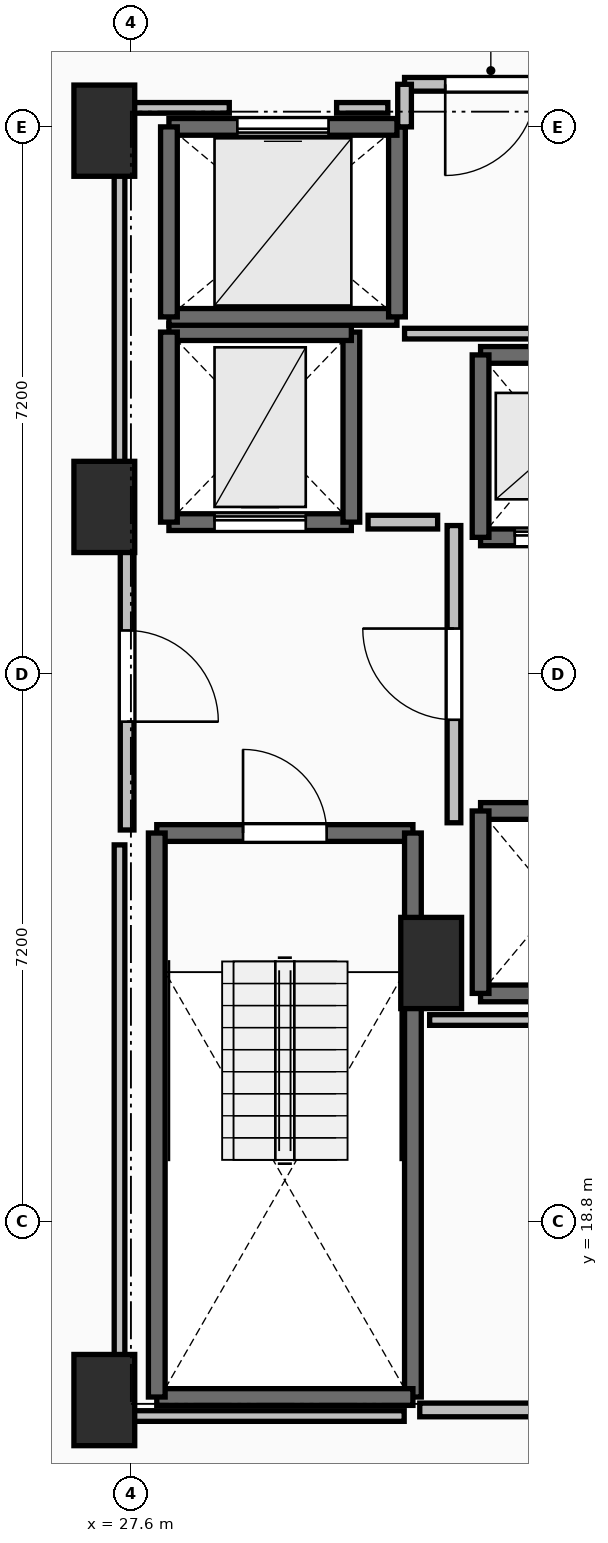
"""IFC4 building model, lengths in metres.
Left out: names, types, materials, properties, quantities, classifications, styles, units other than length and angle.
Written with IfcOpenShell. Run it as: python <this file> out.ifc"""

import sys

from ifc_helpers import new_model, si_unit, direction, frame, frame_2d, origin, origin_2d, place, context, subcontext, project, spatial, rectangle, extrude, element, fill, save


model = new_model("IFC4")
c1 = context("Model", 3, precision=1e-05, world=origin(), true_north=direction((0.0, 1.0)))
c2 = subcontext(c1, "Body", "Model", "MODEL_VIEW")
j1 = project(units=[si_unit("LENGTHUNIT", "METRE"), si_unit("PLANEANGLEUNIT", "RADIAN")], contexts=[c1])
p1 = place(None, origin())
s1 = spatial("IfcSite", under=j1, at=p1, CompositionType="ELEMENT")
p2 = place(p1, origin())
s2 = spatial("IfcBuilding", under=s1, at=p2, CompositionType="ELEMENT")
p3 = place(p2, frame((0.0, 0.0, 38.0)))
s3 = spatial("IfcBuildingStorey", under=s2, at=p3, CompositionType="ELEMENT", Elevation=38.0)
for number, where, z_axis, x_axis in (
    (1, (27.25, 16.45, 0.0), (0.0, 0.0, 1.0), (1.0, 0.0, 0.0)),
    (2, (27.25, 28.2, 0.0), (0.0, 0.0, 1.0), (1.0, 0.0, 0.0)),
    (3, (27.25, 33.15, 0.0), (0.0, 0.0, 1.0), (1.0, 0.0, 0.0)),
    (4, (31.55, 22.2, 0.0), (0.0, 0.0, 1.0), (1.0, 0.0, 0.0)),
):
    element("IfcColumn", number, at=place(p3, frame(where, z_axis=z_axis, x_axis=x_axis)), inside=s3, PredefinedType="PILASTER", context=c2, shape_type="SweptSolid", body=[
        extrude(rectangle(XDim=0.8, YDim=1.2, at=origin_2d()), origin(), (0.0, 0.0, 1.0), 3.5),
    ])
p4 = place(p3, frame((27.94, 23.91, 0.0), z_axis=(0.0, 0.0, 1.0), x_axis=(1.0, 0.0, 0.0)))
e5 = element("IfcWall", 5, at=p4, inside=s3, PredefinedType="SOLIDWALL", context=c2, shape_type="SweptSolid", body=[
    extrude(rectangle(XDim=3.37, YDim=0.22, at=frame_2d((1.685, 0.0))), origin(), (0.0, 0.0, 1.0), 3.24),
])
p5 = place(p4, frame((1.135, 0.0, 0.0)))
e6 = element("IfcOpeningElement", 6, at=p5, cuts=e5, PredefinedType="OPENING", context=c2, shape_type="SweptSolid", body=[
    extrude(rectangle(XDim=1.1, YDim=2.15, at=frame_2d((0.55, 1.075))), frame((0.0, 0.125, 0.0), z_axis=(0.0, -1.0, 0.0), x_axis=(1.0, 0.0, 0.0)), (0.0, 0.0, 1.0), 0.25),
])
p6 = place(p3, frame((31.31, 23.91, 0.0), z_axis=(0.0, 0.0, 1.0), x_axis=(0.0, -1.0, 0.0)))
e7 = element("IfcWall", 7, at=p6, inside=s3, PredefinedType="SOLIDWALL", context=c2, shape_type="SweptSolid", body=[
    extrude(rectangle(XDim=7.42, YDim=0.22, at=frame_2d((3.71, 0.0))), origin(), (0.0, 0.0, 1.0), 3.24),
])
p7 = place(p3, frame((31.31, 16.49, 0.0), z_axis=(0.0, 0.0, 1.0), x_axis=(-1.0, 0.0, 0.0)))
e8 = element("IfcWall", 8, at=p7, inside=s3, PredefinedType="SOLIDWALL", context=c2, shape_type="SweptSolid", body=[
    extrude(rectangle(XDim=3.37, YDim=0.22, at=frame_2d((1.685, 0.0))), origin(), (0.0, 0.0, 1.0), 3.24),
])
p8 = place(p3, frame((27.94, 16.49, 0.0), z_axis=(0.0, 0.0, 1.0), x_axis=(0.0, 1.0, 0.0)))
e9 = element("IfcWall", 9, at=p8, inside=s3, PredefinedType="SOLIDWALL", context=c2, shape_type="SweptSolid", body=[
    extrude(rectangle(XDim=7.42, YDim=0.22, at=frame_2d((3.71, 0.0))), origin(), (0.0, 0.0, 1.0), 3.24),
])
p9 = place(p3, frame((32.2, 27.8, 0.0), z_axis=(0.0, 0.0, 1.0), x_axis=(1.0, 0.0, 0.0)))
e10 = element("IfcWall", 10, at=p9, inside=s3, PredefinedType="SOLIDWALL", context=c2, shape_type="SweptSolid", body=[
    extrude(rectangle(XDim=2.0, YDim=0.22, at=frame_2d((1.0, 0.0))), origin(), (0.0, 0.0, 1.0), 3.24),
])
p10 = place(p9, frame((0.45, 0.0, 0.0)))
e11 = element("IfcOpeningElement", 11, at=p10, cuts=e10, PredefinedType="OPENING", context=c2, shape_type="SweptSolid", body=[
    extrude(rectangle(XDim=1.1, YDim=2.2, at=frame_2d((0.55, 1.1))), frame((0.0, 0.125, 0.0), z_axis=(0.0, -1.0, 0.0), x_axis=(1.0, 0.0, 0.0)), (0.0, 0.0, 1.0), 0.25),
])
p11 = place(p3, frame((34.2, 30.2, 0.0), z_axis=(0.0, 0.0, 1.0), x_axis=(-1.0, 0.0, 0.0)))
e12 = element("IfcWall", 12, at=p11, inside=s3, PredefinedType="SOLIDWALL", context=c2, shape_type="SweptSolid", body=[
    extrude(rectangle(XDim=2.0, YDim=0.22, at=frame_2d((1.0, 0.0))), origin(), (0.0, 0.0, 1.0), 3.24),
])
p12 = place(p3, frame((32.2, 30.2, 0.0), z_axis=(0.0, 0.0, 1.0), x_axis=(0.0, -1.0, 0.0)))
e13 = element("IfcWall", 13, at=p12, inside=s3, PredefinedType="SOLIDWALL", context=c2, shape_type="SweptSolid", body=[
    extrude(rectangle(XDim=2.4, YDim=0.22, at=frame_2d((1.2, 0.0))), origin(), (0.0, 0.0, 1.0), 3.24),
])
for number, where, z_axis, x_axis in (
    (14, (32.2, 21.8, 0.0), (0.0, 0.0, 1.0), (1.0, 0.0, 0.0)),
    (15, (34.2, 24.2, 0.0), (0.0, 0.0, 1.0), (-1.0, 0.0, 0.0)),
):
    element("IfcWall", number, at=place(p3, frame(where, z_axis=z_axis, x_axis=x_axis)), inside=s3, PredefinedType="SOLIDWALL", context=c2, shape_type="SweptSolid", body=[
        extrude(rectangle(XDim=2.0, YDim=0.22, at=frame_2d((1.0, 0.0))), origin(), (0.0, 0.0, 1.0), 3.24),
    ])
p13 = place(p3, frame((32.2, 24.2, 0.0), z_axis=(0.0, 0.0, 1.0), x_axis=(0.0, -1.0, 0.0)))
e16 = element("IfcWall", 16, at=p13, inside=s3, PredefinedType="SOLIDWALL", context=c2, shape_type="SweptSolid", body=[
    extrude(rectangle(XDim=2.4, YDim=0.22, at=frame_2d((1.2, 0.0))), origin(), (0.0, 0.0, 1.0), 3.24),
])
p14 = place(p3, frame((28.1, 28.0, 0.0), z_axis=(0.0, 0.0, 1.0), x_axis=(1.0, 0.0, 0.0)))
e17 = element("IfcWall", 17, at=p14, inside=s3, PredefinedType="SHEAR", context=c2, shape_type="SweptSolid", body=[
    extrude(rectangle(XDim=2.4, YDim=0.22, at=frame_2d((1.2, 0.0))), origin(), (0.0, 0.0, 1.0), 3.24),
])
p15 = place(p14, frame((0.6, 0.0, 0.0)))
e18 = element("IfcOpeningElement", 18, at=p15, cuts=e17, PredefinedType="OPENING", context=c2, shape_type="SweptSolid", body=[
    extrude(rectangle(XDim=1.2, YDim=2.2, at=frame_2d((0.6, 1.1))), frame((0.0, 0.125, 0.0), z_axis=(0.0, -1.0, 0.0), x_axis=(1.0, 0.0, 0.0)), (0.0, 0.0, 1.0), 0.25),
])
p16 = place(p3, frame((30.5, 28.0, 0.0), z_axis=(0.0, 0.0, 1.0), x_axis=(0.0, 1.0, 0.0)))
e19 = element("IfcWall", 19, at=p16, inside=s3, PredefinedType="SHEAR", context=c2, shape_type="SweptSolid", body=[
    extrude(rectangle(XDim=2.5, YDim=0.22, at=frame_2d((1.25, 0.0))), origin(), (0.0, 0.0, 1.0), 3.24),
])
p17 = place(p3, frame((30.5, 30.5, 0.0), z_axis=(0.0, 0.0, 1.0), x_axis=(-1.0, 0.0, 0.0)))
e20 = element("IfcWall", 20, at=p17, inside=s3, PredefinedType="SHEAR", context=c2, shape_type="SweptSolid", body=[
    extrude(rectangle(XDim=2.4, YDim=0.22, at=frame_2d((1.2, 0.0))), origin(), (0.0, 0.0, 1.0), 3.24),
])
p18 = place(p3, frame((28.1, 30.5, 0.0), z_axis=(0.0, 0.0, 1.0), x_axis=(0.0, -1.0, 0.0)))
e21 = element("IfcWall", 21, at=p18, inside=s3, PredefinedType="SHEAR", context=c2, shape_type="SweptSolid", body=[
    extrude(rectangle(XDim=2.5, YDim=0.22, at=frame_2d((1.25, 0.0))), origin(), (0.0, 0.0, 1.0), 3.24),
])
p19 = place(p3, frame((28.1, 30.7, 0.0), z_axis=(0.0, 0.0, 1.0), x_axis=(1.0, 0.0, 0.0)))
e22 = element("IfcWall", 22, at=p19, inside=s3, PredefinedType="SOLIDWALL", context=c2, shape_type="SweptSolid", body=[
    extrude(rectangle(XDim=3.0, YDim=0.22, at=frame_2d((1.5, 0.0))), origin(), (0.0, 0.0, 1.0), 3.24),
])
p20 = place(p3, frame((31.1, 30.7, 0.0), z_axis=(0.0, 0.0, 1.0), x_axis=(0.0, 1.0, 0.0)))
e23 = element("IfcWall", 23, at=p20, inside=s3, PredefinedType="SOLIDWALL", context=c2, shape_type="SweptSolid", body=[
    extrude(rectangle(XDim=2.5, YDim=0.22, at=frame_2d((1.25, 0.0))), origin(), (0.0, 0.0, 1.0), 3.24),
])
p21 = place(p3, frame((31.1, 33.2, 0.0), z_axis=(0.0, 0.0, 1.0), x_axis=(-1.0, 0.0, 0.0)))
e24 = element("IfcWall", 24, at=p21, inside=s3, PredefinedType="SOLIDWALL", context=c2, shape_type="SweptSolid", body=[
    extrude(rectangle(XDim=3.0, YDim=0.22, at=frame_2d((1.5, 0.0))), origin(), (0.0, 0.0, 1.0), 3.24),
])
p22 = place(p21, frame((0.9, 0.0, 0.0)))
e25 = element("IfcOpeningElement", 25, at=p22, cuts=e24, PredefinedType="OPENING", context=c2, shape_type="SweptSolid", body=[
    extrude(rectangle(XDim=1.2, YDim=2.2, at=frame_2d((0.6, 1.1))), frame((0.0, 0.125, 0.0), z_axis=(0.0, -1.0, 0.0), x_axis=(1.0, 0.0, 0.0)), (0.0, 0.0, 1.0), 0.25),
])
p23 = place(p3, frame((28.1, 33.2, 0.0), z_axis=(0.0, 0.0, 1.0), x_axis=(0.0, -1.0, 0.0)))
e26 = element("IfcWall", 26, at=p23, inside=s3, PredefinedType="SOLIDWALL", context=c2, shape_type="SweptSolid", body=[
    extrude(rectangle(XDim=2.5, YDim=0.22, at=frame_2d((1.25, 0.0))), origin(), (0.0, 0.0, 1.0), 3.24),
])
p24 = place(p3, frame((31.85, 24.045, 0.0), z_axis=(0.0, 0.0, 1.0), x_axis=(0.0, 1.0, 0.0)))
e27 = element("IfcWall", 27, at=p24, inside=s3, PredefinedType="PARTITIONING", context=c2, shape_type="SweptSolid", body=[
    extrude(rectangle(XDim=3.91, YDim=0.18, at=frame_2d((1.955, 0.0))), origin(), (0.0, 0.0, 1.0), 3.24),
])
p25 = place(p24, frame((1.355, 0.0, 0.0)))
e28 = element("IfcOpeningElement", 28, at=p25, cuts=e27, PredefinedType="OPENING", context=c2, shape_type="SweptSolid", body=[
    extrude(rectangle(XDim=1.2, YDim=2.15, at=frame_2d((0.6, 1.075))), frame((0.0, 0.105, 0.0), z_axis=(0.0, -1.0, 0.0), x_axis=(1.0, 0.0, 0.0)), (0.0, 0.0, 1.0), 0.21),
])
p26 = place(p3, frame((27.55, 28.0, 0.0), z_axis=(0.0, 0.0, 1.0), x_axis=(0.0, -1.0, 0.0)))
e29 = element("IfcWall", 29, at=p26, inside=s3, PredefinedType="PARTITIONING", context=c2, shape_type="SweptSolid", body=[
    extrude(rectangle(XDim=4.05, YDim=0.18, at=frame_2d((2.025, 0.0))), origin(), (0.0, 0.0, 1.0), 3.24),
])
p27 = place(p26, frame((1.425, 0.0, 0.0)))
e30 = element("IfcOpeningElement", 30, at=p27, cuts=e29, PredefinedType="OPENING", context=c2, shape_type="SweptSolid", body=[
    extrude(rectangle(XDim=1.2, YDim=2.15, at=frame_2d((0.6, 1.075))), frame((0.0, 0.105, 0.0), z_axis=(0.0, -1.0, 0.0), x_axis=(1.0, 0.0, 0.0)), (0.0, 0.0, 1.0), 0.21),
])
p28 = place(p3, frame((33.47, 33.76, 0.0), z_axis=(0.0, 0.0, 1.0), x_axis=(-1.0, 0.0, 0.0)))
e31 = element("IfcWall", 31, at=p28, inside=s3, PredefinedType="PARTITIONING", context=c2, shape_type="SweptSolid", body=[
    extrude(rectangle(XDim=2.27, YDim=0.18, at=frame_2d((1.135, 0.0))), origin(), (0.0, 0.0, 1.0), 3.24),
])
p29 = place(p28, frame((0.535, 0.0, 0.0)))
e32 = element("IfcOpeningElement", 32, at=p29, cuts=e31, PredefinedType="OPENING", context=c2, shape_type="SweptSolid", body=[
    extrude(rectangle(XDim=1.2, YDim=2.15, at=frame_2d((0.6, 1.075))), frame((0.0, 0.105, 0.0), z_axis=(0.0, -1.0, 0.0), x_axis=(1.0, 0.0, 0.0)), (0.0, 0.0, 1.0), 0.21),
])
p30 = place(p3, frame((31.2, 33.76, 0.0), z_axis=(0.0, 0.0, 1.0), x_axis=(0.0, -1.0, 0.0)))
e33 = element("IfcWall", 33, at=p30, inside=s3, PredefinedType="PARTITIONING", context=c2, shape_type="SweptSolid", body=[
    extrude(rectangle(XDim=0.56, YDim=0.18, at=frame_2d((0.28, 0.0))), origin(), (0.0, 0.0, 1.0), 3.24),
])
p31 = place(p3, frame((31.4, 16.32, 0.0), z_axis=(0.0, 0.0, 1.0), x_axis=(1.0, 0.0, 0.0)))
e34 = element("IfcWall", 34, at=p31, inside=s3, PredefinedType="PARTITIONING", context=c2, shape_type="SweptSolid", body=[
    extrude(rectangle(XDim=7.4, YDim=0.18, at=frame_2d((3.7, 0.0))), origin(), (0.0, 0.0, 1.0), 3.24),
])
p32 = place(p31, frame((3.275, 0.0, 0.0)))
e35 = element("IfcOpeningElement", 35, at=p32, cuts=e34, PredefinedType="OPENING", context=c2, shape_type="SweptSolid", body=[
    extrude(rectangle(XDim=0.85, YDim=2.1, at=frame_2d((0.425, 1.05))), frame((0.0, 0.105, 0.0), z_axis=(0.0, -1.0, 0.0), x_axis=(1.0, 0.0, 0.0)), (0.0, 0.0, 1.0), 0.21),
])
p33 = place(p3, frame((31.635, 28.0, 0.0), z_axis=(0.0, 0.0, 1.0), x_axis=(-1.0, 0.0, 0.0)))
e36 = element("IfcWall", 36, at=p33, inside=s3, PredefinedType="PARTITIONING", context=c2, shape_type="SweptSolid", body=[
    extrude(rectangle(XDim=0.915, YDim=0.18, at=frame_2d((0.458, 0.0))), origin(), (0.0, 0.0, 1.0), 3.24),
])
p34 = place(p3, frame((31.2, 30.48, 0.0), z_axis=(0.0, 0.0, 1.0), x_axis=(1.0, 0.0, 0.0)))
e37 = element("IfcWall", 37, at=p34, inside=s3, PredefinedType="PARTITIONING", context=c2, shape_type="SweptSolid", body=[
    extrude(rectangle(XDim=2.05, YDim=0.14, at=frame_2d((1.025, 0.0))), origin(), (0.0, 0.0, 1.0), 3.24),
])
p35 = place(p3, frame((36.439, 21.45, 0.0), z_axis=(0.0, 0.0, 1.0), x_axis=(-1.0, 0.0, 0.0)))
e38 = element("IfcWall", 38, at=p35, inside=s3, PredefinedType="PARTITIONING", context=c2, shape_type="SweptSolid", body=[
    extrude(rectangle(XDim=4.909, YDim=0.14, at=frame_2d((2.455, 0.0))), origin(), (0.0, 0.0, 1.0), 3.24),
])
p36 = place(p3, frame((31.195, 16.24, 0.0), z_axis=(0.0, 0.0, 1.0), x_axis=(-1.0, 0.0, 0.0)))
e39 = element("IfcWall", 39, at=p36, inside=s3, PredefinedType="PARTITIONING", context=c2, shape_type="SweptSolid", body=[
    extrude(rectangle(XDim=3.745, YDim=0.14, at=frame_2d((1.873, 0.0))), origin(), (0.0, 0.0, 1.0), 2.432),
])
p37 = place(p3, frame((27.45, 16.24, 0.0), z_axis=(0.0, 0.0, 1.0), x_axis=(0.0, 1.0, 0.0)))
e40 = element("IfcWall", 40, at=p37, inside=s3, PredefinedType="PARTITIONING", context=c2, shape_type="SweptSolid", body=[
    extrude(rectangle(XDim=7.514, YDim=0.14, at=frame_2d((3.757, 0.0))), origin(), (0.0, 0.0, 1.0), 2.432),
])
p38 = place(p3, frame((27.45, 28.196, 0.0), z_axis=(0.0, 0.0, 1.0), x_axis=(0.0, 1.0, 0.0)))
e41 = element("IfcWall", 41, at=p38, inside=s3, PredefinedType="PARTITIONING", context=c2, shape_type="SweptSolid", body=[
    extrude(rectangle(XDim=5.254, YDim=0.14, at=frame_2d((2.627, 0.0))), origin(), (0.0, 0.0, 1.0), 2.432),
])
p39 = place(p3, frame((27.45, 33.45, 0.0), z_axis=(0.0, 0.0, 1.0), x_axis=(1.0, 0.0, 0.0)))
e42 = element("IfcWall", 42, at=p39, inside=s3, PredefinedType="PARTITIONING", context=c2, shape_type="SweptSolid", body=[
    extrude(rectangle(XDim=1.444, YDim=0.14, at=frame_2d((0.722, 0.0))), origin(), (0.0, 0.0, 1.0), 2.432),
])
p40 = place(p3, frame((30.306, 33.45, 0.0), z_axis=(0.0, 0.0, 1.0), x_axis=(1.0, 0.0, 0.0)))
e43 = element("IfcWall", 43, at=p40, inside=s3, PredefinedType="PARTITIONING", context=c2, shape_type="SweptSolid", body=[
    extrude(rectangle(XDim=0.674, YDim=0.14, at=frame_2d((0.337, 0.0))), origin(), (0.0, 0.0, 1.0), 3.24),
])
p41 = place(p5, origin())
e44 = element("IfcDoor", 44, at=p41, inside=s3, OperationType="SINGLE_SWING_LEFT", PredefinedType="DOOR", context=c2, shape_type="SweptSolid", body=[
    extrude(rectangle(XDim=1.1, YDim=2.15, at=frame_2d((0.55, 1.075))), frame((0.0, 0.025, 0.0), z_axis=(0.0, -1.0, 0.0), x_axis=(1.0, 0.0, 0.0)), (0.0, 0.0, 1.0), 0.05),
])
fill(e6, e44)
p42 = place(p10, origin())
e45 = element("IfcDoor", 45, at=p42, inside=s3, OperationType="SLIDING_TO_LEFT", PredefinedType="DOOR", context=c2, shape_type="SweptSolid", body=[
    extrude(rectangle(XDim=1.1, YDim=2.2, at=frame_2d((0.55, 1.1))), frame((0.0, 0.025, 0.0), z_axis=(0.0, -1.0, 0.0), x_axis=(1.0, 0.0, 0.0)), (0.0, 0.0, 1.0), 0.05),
])
fill(e11, e45)
p43 = place(p15, origin())
e46 = element("IfcDoor", 46, at=p43, inside=s3, OperationType="SLIDING_TO_LEFT", PredefinedType="DOOR", context=c2, shape_type="SweptSolid", body=[
    extrude(rectangle(XDim=1.2, YDim=2.2, at=frame_2d((0.6, 1.1))), frame((0.0, 0.025, 0.0), z_axis=(0.0, -1.0, 0.0), x_axis=(1.0, 0.0, 0.0)), (0.0, 0.0, 1.0), 0.05),
])
fill(e18, e46)
p44 = place(p22, origin())
e47 = element("IfcDoor", 47, at=p44, inside=s3, OperationType="SLIDING_TO_LEFT", PredefinedType="DOOR", context=c2, shape_type="SweptSolid", body=[
    extrude(rectangle(XDim=1.2, YDim=2.2, at=frame_2d((0.6, 1.1))), frame((0.0, 0.025, 0.0), z_axis=(0.0, -1.0, 0.0), x_axis=(1.0, 0.0, 0.0)), (0.0, 0.0, 1.0), 0.05),
])
fill(e25, e47)
p45 = place(p25, origin())
e48 = element("IfcDoor", 48, at=p45, inside=s3, OperationType="SINGLE_SWING_RIGHT", PredefinedType="DOOR", context=c2, shape_type="SweptSolid", body=[
    extrude(rectangle(XDim=1.2, YDim=2.15, at=frame_2d((0.6, 1.075))), frame((0.0, 0.025, 0.0), z_axis=(0.0, -1.0, 0.0), x_axis=(1.0, 0.0, 0.0)), (0.0, 0.0, 1.0), 0.05),
])
fill(e28, e48)
p46 = place(p27, origin())
e49 = element("IfcDoor", 49, at=p46, inside=s3, OperationType="SINGLE_SWING_RIGHT", PredefinedType="DOOR", context=c2, shape_type="SweptSolid", body=[
    extrude(rectangle(XDim=1.2, YDim=2.15, at=frame_2d((0.6, 1.075))), frame((0.0, 0.025, 0.0), z_axis=(0.0, -1.0, 0.0), x_axis=(1.0, 0.0, 0.0)), (0.0, 0.0, 1.0), 0.05),
])
fill(e30, e49)
p47 = place(p29, origin())
e50 = element("IfcDoor", 50, at=p47, inside=s3, OperationType="SINGLE_SWING_RIGHT", PredefinedType="DOOR", context=c2, shape_type="SweptSolid", body=[
    extrude(rectangle(XDim=1.2, YDim=2.15, at=frame_2d((0.6, 1.075))), frame((0.0, 0.025, 0.0), z_axis=(0.0, -1.0, 0.0), x_axis=(1.0, 0.0, 0.0)), (0.0, 0.0, 1.0), 0.05),
])
fill(e32, e50)
save(model, sys.argv[1])
